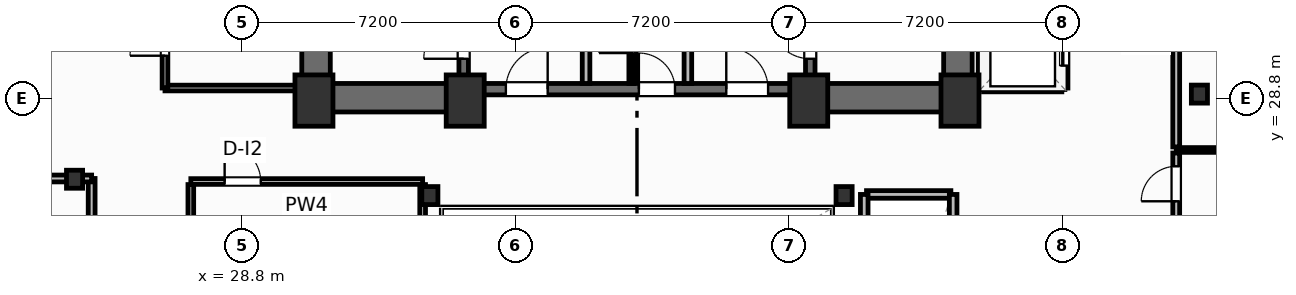
"""IFC4 building model, lengths in metres.
Left out: names, types, materials, properties, quantities, classifications, styles, units other than length and angle.
Written with IfcOpenShell. Run it as: python <this file> out.ifc"""

import sys

from ifc_helpers import new_model, si_unit, direction, frame, frame_2d, origin, origin_2d, place, context, subcontext, project, spatial, rectangle, i_section, extrude, element, fill, save


model = new_model("IFC4")
c1 = context("Model", 3, precision=1e-05, world=origin(), true_north=direction((0.0, 1.0)))
c2 = subcontext(c1, "Body", "Model", "MODEL_VIEW")
j1 = project(units=[si_unit("LENGTHUNIT", "METRE"), si_unit("PLANEANGLEUNIT", "RADIAN")], contexts=[c1])
p1 = place(None, origin())
s1 = spatial("IfcSite", under=j1, at=p1, CompositionType="ELEMENT")
p2 = place(p1, origin())
s2 = spatial("IfcBuilding", under=s1, at=p2, CompositionType="ELEMENT")
p3 = place(p2, frame((0.0, 0.0, 125.4)))
s3 = spatial("IfcBuildingStorey", under=s2, at=p3, CompositionType="ELEMENT", Elevation=125.4)
for number, where, z_axis, x_axis in (
    (1, (30.7, 28.75, 0.0), (0.0, 0.0, 1.0), (1.0, 0.0, 0.0)),
    (2, (34.68, 28.75, 0.0), (0.0, 0.0, 1.0), (1.0, 0.0, 0.0)),
    (3, (43.72, 28.75, 0.0), (0.0, 0.0, 1.0), (1.0, 0.0, 0.0)),
    (4, (47.7, 28.75, 0.0), (0.0, 0.0, 1.0), (1.0, 0.0, 0.0)),
):
    element("IfcColumn", number, at=place(p3, frame(where, z_axis=z_axis, x_axis=x_axis)), inside=s3, PredefinedType="COLUMN", context=c2, shape_type="SweptSolid", body=[
        extrude(rectangle(XDim=1.0, YDim=1.35, at=origin_2d()), origin(), (0.0, 0.0, 1.0), 3.7),
    ])
for number, where, z_axis, x_axis in (
    (5, (33.75, 26.25, 0.0), (0.0, 0.0, 1.0), (1.0, 0.0, 0.0)),
    (6, (44.65, 26.25, 0.0), (0.0, 0.0, 1.0), (1.0, 0.0, 0.0)),
    (7, (24.4, 26.68, 0.0), (0.0, 0.0, 1.0), (1.0, 0.0, 0.0)),
    (8, (54.0, 28.92, 0.0), (0.0, 0.0, 1.0), (1.0, 0.0, 0.0)),
):
    element("IfcColumn", number, at=place(p3, frame(where, z_axis=z_axis, x_axis=x_axis)), inside=s3, PredefinedType="COLUMN", context=c2, shape_type="SweptSolid", body=[
        extrude(i_section(OverallWidth=0.424, OverallDepth=0.474, WebThickness=0.048, FlangeThickness=0.077, FilletRadius=0.025, at=origin_2d()), origin(), (0.0, 0.0, 1.0), 3.7),
    ])
for number, where, z_axis, x_axis in (
    (9, (30.755, 29.2, 0.0), (0.0, 0.0, 1.0), (0.0, 1.0, 0.0)),
    (10, (47.645, 29.2, 0.0), (0.0, 0.0, 1.0), (0.0, 1.0, 0.0)),
):
    element("IfcWall", number, at=place(p3, frame(where, z_axis=z_axis, x_axis=x_axis)), inside=s3, PredefinedType="SHEAR", context=c2, shape_type="SweptSolid", body=[
        extrude(rectangle(XDim=9.22, YDim=0.75, at=frame_2d((4.61, 0.0))), origin(), (0.0, 0.0, 1.0), 3.45),
    ])
p4 = place(p3, frame((30.38, 28.825, 0.0), z_axis=(0.0, 0.0, 1.0), x_axis=(1.0, 0.0, 0.0)))
e11 = element("IfcWall", 11, at=p4, inside=s3, PredefinedType="SHEAR", context=c2, shape_type="SweptSolid", body=[
    extrude(rectangle(XDim=4.42, YDim=0.75, at=frame_2d((2.21, 0.0))), origin(), (0.0, 0.0, 1.0), 3.45),
])
p5 = place(p3, frame((43.6, 28.825, 0.0), z_axis=(0.0, 0.0, 1.0), x_axis=(1.0, 0.0, 0.0)))
e12 = element("IfcWall", 12, at=p5, inside=s3, PredefinedType="SHEAR", context=c2, shape_type="SweptSolid", body=[
    extrude(rectangle(XDim=4.42, YDim=0.75, at=frame_2d((2.21, 0.0))), origin(), (0.0, 0.0, 1.0), 3.45),
])
p6 = place(p3, frame((34.8, 29.05, 0.0), z_axis=(0.0, 0.0, 1.0), x_axis=(1.0, 0.0, 0.0)))
e13 = element("IfcWall", 13, at=p6, inside=s3, PredefinedType="SHEAR", context=c2, shape_type="SweptSolid", body=[
    extrude(rectangle(XDim=8.8, YDim=0.3, at=frame_2d((4.4, 0.0))), origin(), (0.0, 0.0, 1.0), 3.45),
])
p7 = place(p6, frame((0.95, 0.0, 0.0)))
e14 = element("IfcOpeningElement", 14, at=p7, cuts=e13, PredefinedType="OPENING", context=c2, shape_type="SweptSolid", body=[
    extrude(rectangle(XDim=1.1, YDim=2.15, at=frame_2d((0.55, 1.075))), frame((0.0, 0.16, 0.0), z_axis=(0.0, -1.0, 0.0), x_axis=(1.0, 0.0, 0.0)), (0.0, 0.0, 1.0), 0.32),
])
p8 = place(p6, frame((6.75, 0.0, 0.0)))
e15 = element("IfcOpeningElement", 15, at=p8, cuts=e13, PredefinedType="OPENING", context=c2, shape_type="SweptSolid", body=[
    extrude(rectangle(XDim=1.1, YDim=2.15, at=frame_2d((0.55, 1.075))), frame((0.0, 0.16, 0.0), z_axis=(0.0, -1.0, 0.0), x_axis=(1.0, 0.0, 0.0)), (0.0, 0.0, 1.0), 0.32),
])
p9 = place(p6, frame((4.45, 0.0, 0.0)))
e16 = element("IfcOpeningElement", 16, at=p9, cuts=e13, PredefinedType="OPENING", context=c2, shape_type="SweptSolid", body=[
    extrude(rectangle(XDim=0.95, YDim=2.15, at=frame_2d((0.475, 1.075))), frame((0.0, 0.16, 0.0), z_axis=(0.0, -1.0, 0.0), x_axis=(1.0, 0.0, 0.0)), (0.0, 0.0, 1.0), 0.32),
])
p10 = place(p3, frame((34.64, 29.2, 0.0), z_axis=(0.0, 0.0, 1.0), x_axis=(0.0, 1.0, 0.0)))
e17 = element("IfcWall", 17, at=p10, inside=s3, PredefinedType="SHEAR", context=c2, shape_type="SweptSolid", body=[
    extrude(rectangle(XDim=9.22, YDim=0.25, at=frame_2d((4.61, 0.0))), origin(), (0.0, 0.0, 1.0), 3.45),
])
p11 = place(p10, frame((0.65, 0.0, 0.0)))
e18 = element("IfcOpeningElement", 18, at=p11, cuts=e17, PredefinedType="OPENING", context=c2, shape_type="SweptSolid", body=[
    extrude(rectangle(XDim=1.05, YDim=2.15, at=frame_2d((0.525, 1.075))), frame((0.0, 0.135, 0.0), z_axis=(0.0, -1.0, 0.0), x_axis=(1.0, 0.0, 0.0)), (0.0, 0.0, 1.0), 0.27),
])
p12 = place(p3, frame((43.76, 29.2, 0.0), z_axis=(0.0, 0.0, 1.0), x_axis=(0.0, 1.0, 0.0)))
e19 = element("IfcWall", 19, at=p12, inside=s3, PredefinedType="SHEAR", context=c2, shape_type="SweptSolid", body=[
    extrude(rectangle(XDim=9.22, YDim=0.25, at=frame_2d((4.61, 0.0))), origin(), (0.0, 0.0, 1.0), 3.45),
])
p13 = place(p12, frame((0.65, 0.0, 0.0)))
e20 = element("IfcOpeningElement", 20, at=p13, cuts=e19, PredefinedType="OPENING", context=c2, shape_type="SweptSolid", body=[
    extrude(rectangle(XDim=1.05, YDim=2.15, at=frame_2d((0.525, 1.075))), frame((0.0, 0.135, 0.0), z_axis=(0.0, -1.0, 0.0), x_axis=(1.0, 0.0, 0.0)), (0.0, 0.0, 1.0), 0.27),
])
p14 = place(p3, frame((24.85, 19.2, 0.0), z_axis=(0.0, 0.0, 1.0), x_axis=(0.0, 1.0, 0.0)))
e21 = element("IfcWall", 21, at=p14, inside=s3, PredefinedType="PARTITIONING", context=c2, shape_type="SweptSolid", body=[
    extrude(rectangle(XDim=7.5, YDim=0.18, at=frame_2d((3.75, 0.0))), origin(), (0.0, 0.0, 1.0), 3.45),
])
p15 = place(p14, frame((3.275, 0.0, 0.0)))
e22 = element("IfcOpeningElement", 22, at=p15, cuts=e21, PredefinedType="OPENING", context=c2, shape_type="SweptSolid", body=[
    extrude(rectangle(XDim=0.95, YDim=2.05, at=frame_2d((0.475, 1.025))), frame((0.0, 0.1, 0.0), z_axis=(0.0, -1.0, 0.0), x_axis=(1.0, 0.0, 0.0)), (0.0, 0.0, 1.0), 0.2),
])
p16 = place(p3, frame((2.078, 26.7, 0.0), z_axis=(0.0, 0.0, 1.0), x_axis=(1.0, 0.0, 0.0)))
e23 = element("IfcWall", 23, at=p16, inside=s3, PredefinedType="PARTITIONING", context=c2, shape_type="SweptSolid", body=[
    extrude(rectangle(XDim=22.772, YDim=0.18, at=frame_2d((11.386, 0.0))), origin(), (0.0, 0.0, 1.0), 2.662),
])
p17 = place(p3, frame((53.39, 19.3, 0.0), z_axis=(0.0, 0.0, 1.0), x_axis=(0.0, 1.0, 0.0)))
e24 = element("IfcWall", 24, at=p17, inside=s3, PredefinedType="PARTITIONING", context=c2, shape_type="SweptSolid", body=[
    extrude(rectangle(XDim=8.07, YDim=0.18, at=frame_2d((4.035, 0.0))), origin(), (0.0, 0.0, 1.0), 3.45),
])
p18 = place(p17, frame((6.8, 0.0, 0.0)))
e25 = element("IfcOpeningElement", 25, at=p18, cuts=e24, PredefinedType="OPENING", context=c2, shape_type="SweptSolid", body=[
    extrude(rectangle(XDim=0.92, YDim=2.05, at=frame_2d((0.46, 1.025))), frame((0.0, 0.1, 0.0), z_axis=(0.0, -1.0, 0.0), x_axis=(1.0, 0.0, 0.0)), (0.0, 0.0, 1.0), 0.2),
])
p19 = place(p3, frame((53.39, 27.53, 0.0), z_axis=(0.0, 0.0, 1.0), x_axis=(0.0, 1.0, 0.0)))
e26 = element("IfcWall", 26, at=p19, inside=s3, PredefinedType="PARTITIONING", context=c2, shape_type="SweptSolid", body=[
    extrude(rectangle(XDim=11.67, YDim=0.18, at=frame_2d((5.835, 0.0))), origin(), (0.0, 0.0, 1.0), 3.45),
])
p20 = place(p19, frame((5.8, 0.0, 0.0)))
e27 = element("IfcOpeningElement", 27, at=p20, cuts=e26, PredefinedType="OPENING", context=c2, shape_type="SweptSolid", body=[
    extrude(rectangle(XDim=0.92, YDim=2.05, at=frame_2d((0.46, 1.025))), frame((0.0, 0.1, 0.0), z_axis=(0.0, -1.0, 0.0), x_axis=(1.0, 0.0, 0.0)), (0.0, 0.0, 1.0), 0.2),
])
p21 = place(p3, frame((53.39, 27.45, 0.0), z_axis=(0.0, 0.0, 1.0), x_axis=(1.0, 0.0, 0.0)))
e28 = element("IfcWall", 28, at=p21, inside=s3, PredefinedType="PARTITIONING", context=c2, shape_type="SweptSolid", body=[
    extrude(rectangle(XDim=23.362, YDim=0.125, at=frame_2d((11.681, 0.0))), origin(), (0.0, 0.0, 1.0), 3.45),
])
for number, where, z_axis, x_axis in (
    (29, (37.86, 29.2, 0.0), (0.0, 0.0, 1.0), (0.0, 1.0, 0.0)),
    (30, (40.54, 29.2, 0.0), (0.0, 0.0, 1.0), (0.0, 1.0, 0.0)),
):
    element("IfcWall", number, at=place(p3, frame(where, z_axis=z_axis, x_axis=x_axis)), inside=s3, PredefinedType="PARTITIONING", context=c2, shape_type="SweptSolid", body=[
        extrude(rectangle(XDim=5.18, YDim=0.2, at=frame_2d((2.59, 0.0))), origin(), (0.0, 0.0, 1.0), 3.45),
    ])
p22 = place(p3, frame((39.05, 29.2, 0.0), z_axis=(0.0, 0.0, 1.0), x_axis=(0.0, 1.0, 0.0)))
e31 = element("IfcWall", 31, at=p22, inside=s3, PredefinedType="PARTITIONING", context=c2, shape_type="SweptSolid", body=[
    extrude(rectangle(XDim=5.22, YDim=0.125, at=frame_2d((2.61, 0.0))), origin(), (0.0, 0.0, 1.0), 3.45),
])
p23 = place(p22, frame((0.8, 0.0, 0.0)))
e32 = element("IfcOpeningElement", 32, at=p23, cuts=e31, PredefinedType="OPENING", context=c2, shape_type="SweptSolid", body=[
    extrude(rectangle(XDim=0.85, YDim=2.05, at=frame_2d((0.425, 1.025))), frame((0.0, 0.073, 0.0), z_axis=(0.0, -1.0, 0.0), x_axis=(1.0, 0.0, 0.0)), (0.0, 0.0, 1.0), 0.145),
])
p24 = place(p22, frame((3.4, 0.0, 0.0)))
e33 = element("IfcOpeningElement", 33, at=p24, cuts=e31, PredefinedType="OPENING", context=c2, shape_type="SweptSolid", body=[
    extrude(rectangle(XDim=0.85, YDim=2.05, at=frame_2d((0.425, 1.025))), frame((0.0, 0.073, 0.0), z_axis=(0.0, -1.0, 0.0), x_axis=(1.0, 0.0, 0.0)), (0.0, 0.0, 1.0), 0.145),
])
p25 = place(p3, frame((27.46, 26.62, 0.0), z_axis=(0.0, 0.0, 1.0), x_axis=(1.0, 0.0, 0.0)))
e34 = element("IfcWall", 34, at=p25, inside=s3, PredefinedType="PARTITIONING", context=c2, shape_type="SweptSolid", body=[
    extrude(rectangle(XDim=6.1, YDim=0.15, at=frame_2d((3.05, 0.0))), origin(), (0.0, 0.0, 1.0), 2.662),
])
p26 = place(p25, frame((0.89, 0.0, 0.0)))
e35 = element("IfcOpeningElement", 35, at=p26, cuts=e34, PredefinedType="OPENING", context=c2, shape_type="SweptSolid", body=[
    extrude(rectangle(XDim=0.95, YDim=2.05, at=frame_2d((0.475, 1.025))), frame((0.0, 0.085, 0.0), z_axis=(0.0, -1.0, 0.0), x_axis=(1.0, 0.0, 0.0)), (0.0, 0.0, 1.0), 0.17),
])
p27 = place(p3, frame((27.46, 19.38, 0.0), z_axis=(0.0, 0.0, 1.0), x_axis=(0.0, 1.0, 0.0)))
e36 = element("IfcWall", 36, at=p27, inside=s3, PredefinedType="PARTITIONING", context=c2, shape_type="SweptSolid", body=[
    extrude(rectangle(XDim=7.16, YDim=0.15, at=frame_2d((3.58, 0.0))), origin(), (0.0, 0.0, 1.0), 3.45),
])
p28 = place(p27, frame((1.1, 0.0, 0.0)))
e37 = element("IfcOpeningElement", 37, at=p28, cuts=e36, PredefinedType="OPENING", context=c2, shape_type="SweptSolid", body=[
    extrude(rectangle(XDim=0.9, YDim=2.05, at=frame_2d((0.45, 1.025))), frame((0.0, 0.085, 0.0), z_axis=(0.0, -1.0, 0.0), x_axis=(1.0, 0.0, 0.0)), (0.0, 0.0, 1.0), 0.17),
])
p29 = place(p3, frame((33.56, 19.38, 0.0), z_axis=(0.0, 0.0, 1.0), x_axis=(0.0, 1.0, 0.0)))
e38 = element("IfcWall", 38, at=p29, inside=s3, PredefinedType="PARTITIONING", context=c2, shape_type="SweptSolid", body=[
    extrude(rectangle(XDim=7.16, YDim=0.15, at=frame_2d((3.58, 0.0))), origin(), (0.0, 0.0, 1.0), 2.824),
])
p30 = place(p3, frame((26.78, 29.08, 0.0), z_axis=(0.0, 0.0, 1.0), x_axis=(1.0, 0.0, 0.0)))
e39 = element("IfcWall", 39, at=p30, inside=s3, PredefinedType="PARTITIONING", context=c2, shape_type="SweptSolid", body=[
    extrude(rectangle(XDim=3.6, YDim=0.15, at=frame_2d((1.8, 0.0))), origin(), (0.0, 0.0, 1.0), 3.45),
])
p31 = place(p3, frame((26.78, 29.08, 0.0), z_axis=(0.0, 0.0, 1.0), x_axis=(0.0, 1.0, 0.0)))
e40 = element("IfcWall", 40, at=p31, inside=s3, PredefinedType="PARTITIONING", context=c2, shape_type="SweptSolid", body=[
    extrude(rectangle(XDim=5.87, YDim=0.15, at=frame_2d((2.935, 0.0))), origin(), (0.0, 0.0, 1.0), 3.45),
])
p32 = place(p31, frame((0.85, 0.0, 0.0)))
e41 = element("IfcOpeningElement", 41, at=p32, cuts=e40, PredefinedType="OPENING", context=c2, shape_type="SweptSolid", body=[
    extrude(rectangle(XDim=0.92, YDim=2.05, at=frame_2d((0.46, 1.025))), frame((0.0, 0.085, 0.0), z_axis=(0.0, -1.0, 0.0), x_axis=(1.0, 0.0, 0.0)), (0.0, 0.0, 1.0), 0.17),
])
p33 = place(p31, frame((3.45, 0.0, 0.0)))
e42 = element("IfcOpeningElement", 42, at=p33, cuts=e40, PredefinedType="OPENING", context=c2, shape_type="SweptSolid", body=[
    extrude(rectangle(XDim=0.85, YDim=2.05, at=frame_2d((0.425, 1.025))), frame((0.0, 0.085, 0.0), z_axis=(0.0, -1.0, 0.0), x_axis=(1.0, 0.0, 0.0)), (0.0, 0.0, 1.0), 0.17),
])
p34 = place(p3, frame((48.32, 29.08, 0.0), z_axis=(0.0, 0.0, 1.0), x_axis=(1.0, 0.0, 0.0)))
e43 = element("IfcWall", 43, at=p34, inside=s3, PredefinedType="PARTITIONING", context=c2, shape_type="SweptSolid", body=[
    extrude(rectangle(XDim=2.06, YDim=0.2, at=frame_2d((1.03, 0.0))), origin(), (0.0, 0.0, 1.0), 2.662),
])
p35 = place(p3, frame((48.28, 29.08, 0.0), z_axis=(0.0, 0.0, 1.0), x_axis=(0.0, 1.0, 0.0)))
e44 = element("IfcWall", 44, at=p35, inside=s3, PredefinedType="PARTITIONING", context=c2, shape_type="SweptSolid", body=[
    extrude(rectangle(XDim=6.89, YDim=0.2, at=frame_2d((3.445, 0.0))), origin(), (0.0, 0.0, 1.0), 3.45),
])
p36 = place(p3, frame((50.44, 29.08, 0.0), z_axis=(0.0, 0.0, 1.0), x_axis=(0.0, 1.0, 0.0)))
e45 = element("IfcWall", 45, at=p36, inside=s3, PredefinedType="PARTITIONING", context=c2, shape_type="SweptSolid", body=[
    extrude(rectangle(XDim=6.89, YDim=0.2, at=frame_2d((3.445, 0.0))), origin(), (0.0, 0.0, 1.0), 3.45),
])
p37 = place(p36, frame((0.59, 0.0, 0.0)))
e46 = element("IfcOpeningElement", 46, at=p37, cuts=e45, PredefinedType="OPENING", context=c2, shape_type="SweptSolid", body=[
    extrude(rectangle(XDim=1.1, YDim=2.15, at=frame_2d((0.55, 1.075))), frame((0.0, 0.11, 0.0), z_axis=(0.0, -1.0, 0.0), x_axis=(1.0, 0.0, 0.0)), (0.0, 0.0, 1.0), 0.22),
])
p38 = place(p36, frame((2.89, 0.0, 0.0)))
e47 = element("IfcOpeningElement", 47, at=p38, cuts=e45, PredefinedType="OPENING", context=c2, shape_type="SweptSolid", body=[
    extrude(rectangle(XDim=1.1, YDim=2.15, at=frame_2d((0.55, 1.075))), frame((0.0, 0.11, 0.0), z_axis=(0.0, -1.0, 0.0), x_axis=(1.0, 0.0, 0.0)), (0.0, 0.0, 1.0), 0.22),
])
p39 = place(p36, frame((5.19, 0.0, 0.0)))
e48 = element("IfcOpeningElement", 48, at=p39, cuts=e45, PredefinedType="OPENING", context=c2, shape_type="SweptSolid", body=[
    extrude(rectangle(XDim=1.1, YDim=2.15, at=frame_2d((0.55, 1.075))), frame((0.0, 0.11, 0.0), z_axis=(0.0, -1.0, 0.0), x_axis=(1.0, 0.0, 0.0)), (0.0, 0.0, 1.0), 0.22),
])
p40 = place(p3, frame((45.24, 26.28, 0.0), z_axis=(0.0, 0.0, 1.0), x_axis=(1.0, 0.0, 0.0)))
e49 = element("IfcWall", 49, at=p40, inside=s3, PredefinedType="PARTITIONING", context=c2, shape_type="SweptSolid", body=[
    extrude(rectangle(XDim=2.22, YDim=0.2, at=frame_2d((1.11, 0.0))), origin(), (0.0, 0.0, 1.0), 3.45),
])
for number, where, z_axis, x_axis in (
    (50, (45.18, 19.38, 0.0), (0.0, 0.0, 1.0), (0.0, 1.0, 0.0)),
    (51, (47.52, 19.38, 0.0), (0.0, 0.0, 1.0), (0.0, 1.0, 0.0)),
):
    element("IfcWall", number, at=place(p3, frame(where, z_axis=z_axis, x_axis=x_axis)), inside=s3, PredefinedType="PARTITIONING", context=c2, shape_type="SweptSolid", body=[
        extrude(rectangle(XDim=6.9, YDim=0.2, at=frame_2d((3.45, 0.0))), origin(), (0.0, 0.0, 1.0), 3.45),
    ])
p41 = place(p18, origin())
e52 = element("IfcDoor", 52, at=p41, inside=s3, OperationType="SINGLE_SWING_LEFT", PredefinedType="DOOR", context=c2, shape_type="SweptSolid", body=[
    extrude(rectangle(XDim=0.92, YDim=2.05, at=frame_2d((0.46, 1.025))), frame((0.0, 0.025, 0.0), z_axis=(0.0, -1.0, 0.0), x_axis=(1.0, 0.0, 0.0)), (0.0, 0.0, 1.0), 0.05),
])
fill(e25, e52)
p42 = place(p11, origin())
e53 = element("IfcDoor", 53, at=p42, inside=s3, OperationType="SINGLE_SWING_LEFT", PredefinedType="DOOR", context=c2, shape_type="SweptSolid", body=[
    extrude(rectangle(XDim=1.05, YDim=2.15, at=frame_2d((0.525, 1.075))), frame((0.0, 0.025, 0.0), z_axis=(0.0, -1.0, 0.0), x_axis=(1.0, 0.0, 0.0)), (0.0, 0.0, 1.0), 0.05),
])
fill(e18, e53)
p43 = place(p13, origin())
e54 = element("IfcDoor", 54, at=p43, inside=s3, OperationType="SINGLE_SWING_RIGHT", PredefinedType="DOOR", context=c2, shape_type="SweptSolid", body=[
    extrude(rectangle(XDim=1.05, YDim=2.15, at=frame_2d((0.525, 1.075))), frame((0.0, 0.025, 0.0), z_axis=(0.0, -1.0, 0.0), x_axis=(1.0, 0.0, 0.0)), (0.0, 0.0, 1.0), 0.05),
])
fill(e20, e54)
p44 = place(p7, origin())
e55 = element("IfcDoor", 55, at=p44, inside=s3, OperationType="SINGLE_SWING_RIGHT", PredefinedType="DOOR", context=c2, shape_type="SweptSolid", body=[
    extrude(rectangle(XDim=1.1, YDim=2.15, at=frame_2d((0.55, 1.075))), frame((0.0, 0.025, 0.0), z_axis=(0.0, -1.0, 0.0), x_axis=(1.0, 0.0, 0.0)), (0.0, 0.0, 1.0), 0.05),
])
fill(e14, e55)
p45 = place(p8, origin())
e56 = element("IfcDoor", 56, at=p45, inside=s3, OperationType="SINGLE_SWING_LEFT", PredefinedType="DOOR", context=c2, shape_type="SweptSolid", body=[
    extrude(rectangle(XDim=1.1, YDim=2.15, at=frame_2d((0.55, 1.075))), frame((0.0, 0.025, 0.0), z_axis=(0.0, -1.0, 0.0), x_axis=(1.0, 0.0, 0.0)), (0.0, 0.0, 1.0), 0.05),
])
fill(e15, e56)
p46 = place(p23, origin())
e57 = element("IfcDoor", 57, at=p46, inside=s3, OperationType="SINGLE_SWING_LEFT", PredefinedType="DOOR", context=c2, shape_type="SweptSolid", body=[
    extrude(rectangle(XDim=0.85, YDim=2.05, at=frame_2d((0.425, 1.025))), frame((0.0, 0.025, 0.0), z_axis=(0.0, -1.0, 0.0), x_axis=(1.0, 0.0, 0.0)), (0.0, 0.0, 1.0), 0.05),
])
fill(e32, e57)
p47 = place(p9, origin())
e58 = element("IfcDoor", 58, at=p47, inside=s3, OperationType="SINGLE_SWING_LEFT", PredefinedType="DOOR", context=c2, shape_type="SweptSolid", body=[
    extrude(rectangle(XDim=0.95, YDim=2.15, at=frame_2d((0.475, 1.075))), frame((0.0, 0.025, 0.0), z_axis=(0.0, -1.0, 0.0), x_axis=(1.0, 0.0, 0.0)), (0.0, 0.0, 1.0), 0.05),
])
fill(e16, e58)
p48 = place(p26, origin())
e59 = element("IfcDoor", 59, at=p48, inside=s3, OperationType="SINGLE_SWING_LEFT", PredefinedType="DOOR", context=c2, shape_type="SweptSolid", body=[
    extrude(rectangle(XDim=0.95, YDim=2.05, at=frame_2d((0.475, 1.025))), frame((0.0, 0.025, 0.0), z_axis=(0.0, -1.0, 0.0), x_axis=(1.0, 0.0, 0.0)), (0.0, 0.0, 1.0), 0.05),
])
fill(e35, e59)
p49 = place(p32, origin())
e60 = element("IfcDoor", 60, at=p49, inside=s3, OperationType="SINGLE_SWING_LEFT", PredefinedType="DOOR", context=c2, shape_type="SweptSolid", body=[
    extrude(rectangle(XDim=0.92, YDim=2.05, at=frame_2d((0.46, 1.025))), frame((0.0, 0.025, 0.0), z_axis=(0.0, -1.0, 0.0), x_axis=(1.0, 0.0, 0.0)), (0.0, 0.0, 1.0), 0.05),
])
fill(e41, e60)
p50 = place(p37, origin())
e61 = element("IfcDoor", 61, at=p50, inside=s3, OperationType="SLIDING_TO_LEFT", PredefinedType="DOOR", context=c2, shape_type="SweptSolid", body=[
    extrude(rectangle(XDim=1.1, YDim=2.15, at=frame_2d((0.55, 1.075))), frame((0.0, 0.025, 0.0), z_axis=(0.0, -1.0, 0.0), x_axis=(1.0, 0.0, 0.0)), (0.0, 0.0, 1.0), 0.05),
])
fill(e46, e61)
save(model, sys.argv[1])
